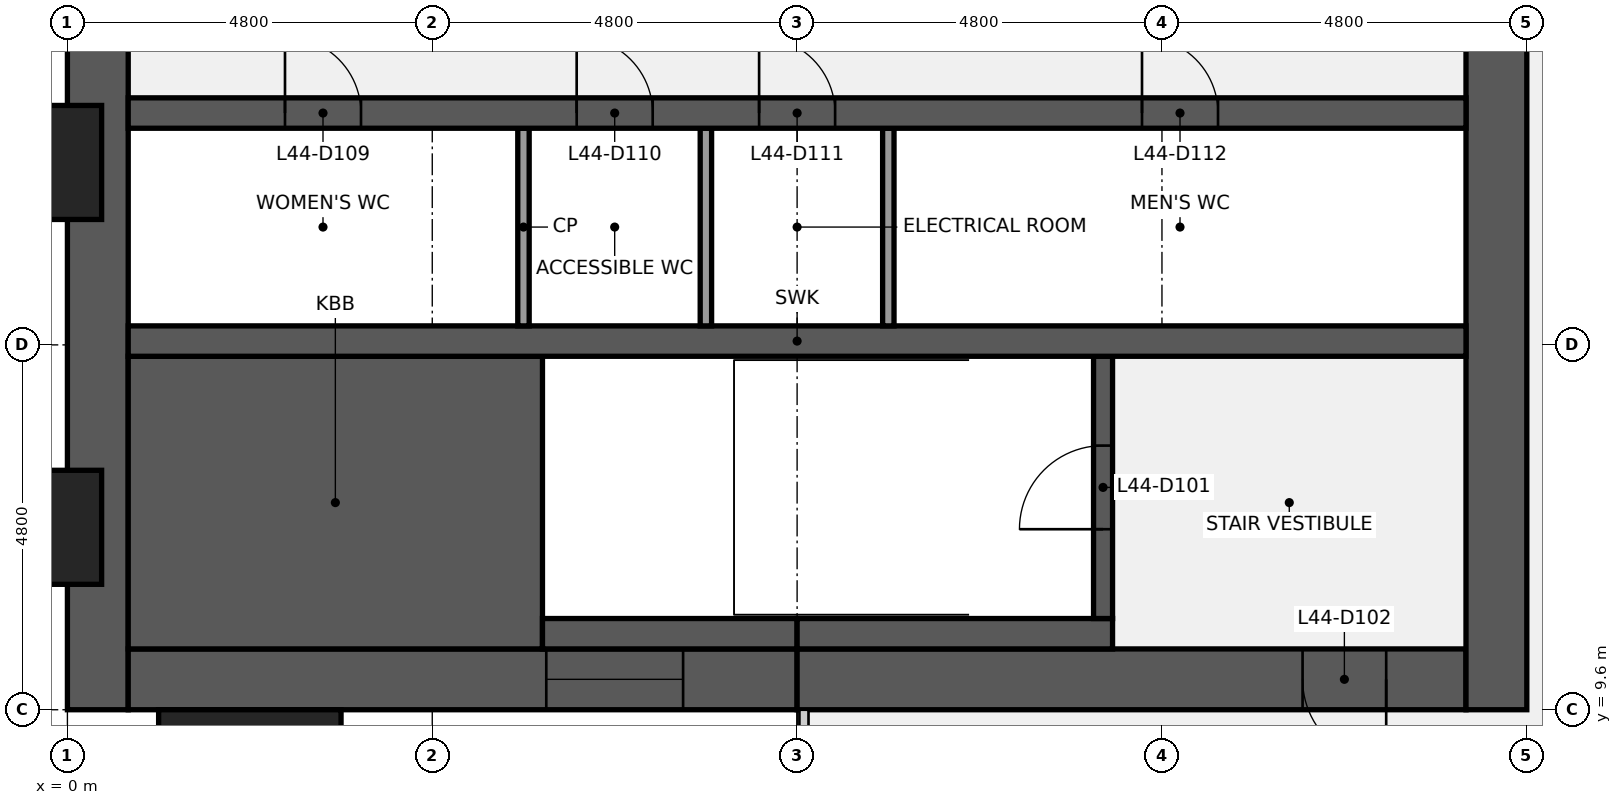
"""IFC4 building model, lengths in metres.
Left out: names, types, materials, properties, quantities, classifications, styles, units other than length and angle.
Written with IfcOpenShell. Run it as: python <this file> out.ifc"""

import sys

from ifc_helpers import new_model, si_unit, direction, frame, frame_2d, origin, origin_2d, place, context, subcontext, project, spatial, rectangle, extrude, element, fill, save


model = new_model("IFC4")
c1 = context("Model", 3, precision=1e-05, world=origin(), true_north=direction((0.0, 1.0)))
c2 = subcontext(c1, "Body", "Model", "MODEL_VIEW")
j1 = project(units=[si_unit("LENGTHUNIT", "METRE"), si_unit("PLANEANGLEUNIT", "RADIAN")], contexts=[c1])
p1 = place(None, origin())
s1 = spatial("IfcSite", under=j1, at=p1, CompositionType="ELEMENT")
p2 = place(p1, origin())
s2 = spatial("IfcBuilding", under=s1, at=p2, CompositionType="ELEMENT")
p3 = place(p2, frame((0.0, 0.0, 205.2)))
s3 = spatial("IfcBuildingStorey", under=s2, at=p3, CompositionType="ELEMENT", Elevation=205.2)
p4 = place(p3, frame((0.4, 9.6, 0.0), z_axis=(0.0, 0.0, 1.0), x_axis=(0.0, 1.0, 0.0)))
e1 = element("IfcWall", 1, at=p4, inside=s3, PredefinedType="SHEAR", context=c2, shape_type="SweptSolid", body=[
    extrude(rectangle(XDim=28.8, YDim=0.8, at=frame_2d((14.4, 0.0))), origin(), (0.0, 0.0, 1.0), 3.84),
])
p5 = place(p4, frame((8.85, 0.0, 0.9)))
e2 = element("IfcOpeningElement", 2, at=p5, cuts=e1, PredefinedType="OPENING", context=c2, shape_type="SweptSolid", body=[
    extrude(rectangle(XDim=1.5, YDim=1.5, at=frame_2d((0.75, 0.75))), frame((0.0, 0.41, 0.0), z_axis=(0.0, -1.0, 0.0), x_axis=(1.0, 0.0, 0.0)), (0.0, 0.0, 1.0), 0.82),
])
p6 = place(p4, frame((18.45, 0.0, 0.9)))
e3 = element("IfcOpeningElement", 3, at=p6, cuts=e1, PredefinedType="OPENING", context=c2, shape_type="SweptSolid", body=[
    extrude(rectangle(XDim=1.5, YDim=1.5, at=frame_2d((0.75, 0.75))), frame((0.0, 0.41, 0.0), z_axis=(0.0, -1.0, 0.0), x_axis=(1.0, 0.0, 0.0)), (0.0, 0.0, 1.0), 0.82),
])
p7 = place(p3, frame((9.6, 10.0, 0.0), z_axis=(0.0, 0.0, 1.0), x_axis=(-1.0, 0.0, 0.0)))
e4 = element("IfcWall", 4, at=p7, inside=s3, PredefinedType="SHEAR", context=c2, shape_type="SweptSolid", body=[
    extrude(rectangle(XDim=8.8, YDim=0.8, at=frame_2d((4.4, 0.0))), origin(), (0.0, 0.0, 1.0), 3.84),
])
p8 = place(p7, frame((1.5, 0.0, 0.9)))
e5 = element("IfcOpeningElement", 5, at=p8, cuts=e4, PredefinedType="OPENING", context=c2, shape_type="SweptSolid", body=[
    extrude(rectangle(XDim=1.8, YDim=1.5, at=frame_2d((0.9, 0.75))), frame((0.0, 0.41, 0.0), z_axis=(0.0, -1.0, 0.0), x_axis=(1.0, 0.0, 0.0)), (0.0, 0.0, 1.0), 0.82),
])
p9 = place(p3, frame((18.4, 10.0, 0.0), z_axis=(0.0, 0.0, 1.0), x_axis=(-1.0, 0.0, 0.0)))
e6 = element("IfcWall", 6, at=p9, inside=s3, PredefinedType="SHEAR", context=c2, shape_type="SweptSolid", body=[
    extrude(rectangle(XDim=8.8, YDim=0.8, at=frame_2d((4.4, 0.0))), origin(), (0.0, 0.0, 1.0), 3.84),
])
p10 = place(p9, frame((1.05, 0.0, 0.0)))
e7 = element("IfcOpeningElement", 7, at=p10, cuts=e6, PredefinedType="OPENING", context=c2, shape_type="SweptSolid", body=[
    extrude(rectangle(XDim=1.1, YDim=2.1, at=frame_2d((0.55, 1.05))), frame((0.0, 0.41, 0.0), z_axis=(0.0, -1.0, 0.0), x_axis=(1.0, 0.0, 0.0)), (0.0, 0.0, 1.0), 0.82),
])
p11 = place(p3, frame((18.8, 38.4, 0.0), z_axis=(0.0, 0.0, 1.0), x_axis=(0.0, -1.0, 0.0)))
e8 = element("IfcWall", 8, at=p11, inside=s3, PredefinedType="SHEAR", context=c2, shape_type="SweptSolid", body=[
    extrude(rectangle(XDim=28.8, YDim=0.8, at=frame_2d((14.4, 0.0))), origin(), (0.0, 0.0, 1.0), 3.84),
])
p12 = place(p11, frame((18.3, 0.0, 0.0)))
e9 = element("IfcOpeningElement", 9, at=p12, cuts=e8, PredefinedType="OPENING", context=c2, shape_type="SweptSolid", body=[
    extrude(rectangle(XDim=1.8, YDim=2.1, at=frame_2d((0.9, 1.05))), frame((0.0, 0.41, 0.0), z_axis=(0.0, -1.0, 0.0), x_axis=(1.0, 0.0, 0.0)), (0.0, 0.0, 1.0), 0.82),
])
p13 = place(p11, frame((8.7, 0.0, 0.0)))
e10 = element("IfcOpeningElement", 10, at=p13, cuts=e8, PredefinedType="OPENING", context=c2, shape_type="SweptSolid", body=[
    extrude(rectangle(XDim=1.8, YDim=2.1, at=frame_2d((0.9, 1.05))), frame((0.0, 0.41, 0.0), z_axis=(0.0, -1.0, 0.0), x_axis=(1.0, 0.0, 0.0)), (0.0, 0.0, 1.0), 0.82),
])
p14 = place(p3, frame((0.8, 12.325, 0.0), z_axis=(0.0, 0.0, 1.0), x_axis=(1.0, 0.0, 0.0)))
e11 = element("IfcWall", 11, at=p14, inside=s3, PredefinedType="SHEAR", context=c2, shape_type="SweptSolid", body=[
    extrude(rectangle(XDim=5.45, YDim=3.85, at=frame_2d((2.725, 0.0))), origin(), (0.0, 0.0, 1.0), 3.84),
])
p15 = place(p3, frame((6.25, 10.6, 0.0), z_axis=(0.0, 0.0, 1.0), x_axis=(1.0, 0.0, 0.0)))
e12 = element("IfcWall", 12, at=p15, inside=s3, PredefinedType="SHEAR", context=c2, shape_type="SweptSolid", body=[
    extrude(rectangle(XDim=3.35, YDim=0.4, at=frame_2d((1.675, 0.0))), origin(), (0.0, 0.0, 1.0), 3.84),
])
p16 = place(p3, frame((9.6, 10.6, 0.0), z_axis=(0.0, 0.0, 1.0), x_axis=(1.0, 0.0, 0.0)))
e13 = element("IfcWall", 13, at=p16, inside=s3, PredefinedType="SHEAR", context=c2, shape_type="SweptSolid", body=[
    extrude(rectangle(XDim=4.15, YDim=0.4, at=frame_2d((2.075, 0.0))), origin(), (0.0, 0.0, 1.0), 3.84),
])
p17 = place(p3, frame((13.625, 10.8, 0.0), z_axis=(0.0, 0.0, 1.0), x_axis=(0.0, 1.0, 0.0)))
e14 = element("IfcWall", 14, at=p17, inside=s3, PredefinedType="SHEAR", context=c2, shape_type="SweptSolid", body=[
    extrude(rectangle(XDim=3.45, YDim=0.25, at=frame_2d((1.725, 0.0))), origin(), (0.0, 0.0, 1.0), 3.84),
])
p18 = place(p17, frame((1.175, 0.0, 0.0)))
e15 = element("IfcOpeningElement", 15, at=p18, cuts=e14, PredefinedType="OPENING", context=c2, shape_type="SweptSolid", body=[
    extrude(rectangle(XDim=1.1, YDim=2.1, at=frame_2d((0.55, 1.05))), frame((0.0, 0.135, 0.0), z_axis=(0.0, -1.0, 0.0), x_axis=(1.0, 0.0, 0.0)), (0.0, 0.0, 1.0), 0.27),
])
p19 = place(p3, frame((0.8, 14.45, 0.0), z_axis=(0.0, 0.0, 1.0), x_axis=(1.0, 0.0, 0.0)))
e16 = element("IfcWall", 16, at=p19, inside=s3, PredefinedType="SHEAR", context=c2, shape_type="SweptSolid", body=[
    extrude(rectangle(XDim=17.6, YDim=0.4, at=frame_2d((8.8, 0.0))), origin(), (0.0, 0.0, 1.0), 3.84),
])
for number, where, z_axis, x_axis in (
    (17, (6.0, 14.65, 0.0), (0.0, 0.0, 1.0), (0.0, 1.0, 0.0)),
    (18, (8.4, 14.65, 0.0), (0.0, 0.0, 1.0), (0.0, 1.0, 0.0)),
    (19, (10.8, 14.65, 0.0), (0.0, 0.0, 1.0), (0.0, 1.0, 0.0)),
):
    element("IfcWall", number, at=place(p3, frame(where, z_axis=z_axis, x_axis=x_axis)), inside=s3, PredefinedType="PARTITIONING", context=c2, shape_type="SweptSolid", body=[
        extrude(rectangle(XDim=2.6, YDim=0.15, at=frame_2d((1.3, 0.0))), origin(), (0.0, 0.0, 1.0), 3.84),
    ])
p20 = place(p3, frame((0.8, 17.45, 0.0), z_axis=(0.0, 0.0, 1.0), x_axis=(1.0, 0.0, 0.0)))
e20 = element("IfcWall", 20, at=p20, inside=s3, PredefinedType="SHEAR", context=c2, shape_type="SweptSolid", body=[
    extrude(rectangle(XDim=17.6, YDim=0.4, at=frame_2d((8.8, 0.0))), origin(), (0.0, 0.0, 1.0), 3.84),
])
p21 = place(p20, frame((2.062, 0.0, 0.0)))
e21 = element("IfcOpeningElement", 21, at=p21, cuts=e20, PredefinedType="OPENING", context=c2, shape_type="SweptSolid", body=[
    extrude(rectangle(XDim=1.0, YDim=2.1, at=frame_2d((0.5, 1.05))), frame((0.0, 0.21, 0.0), z_axis=(0.0, -1.0, 0.0), x_axis=(1.0, 0.0, 0.0)), (0.0, 0.0, 1.0), 0.42),
])
p22 = place(p20, frame((5.9, 0.0, 0.0)))
e22 = element("IfcOpeningElement", 22, at=p22, cuts=e20, PredefinedType="OPENING", context=c2, shape_type="SweptSolid", body=[
    extrude(rectangle(XDim=1.0, YDim=2.1, at=frame_2d((0.5, 1.05))), frame((0.0, 0.21, 0.0), z_axis=(0.0, -1.0, 0.0), x_axis=(1.0, 0.0, 0.0)), (0.0, 0.0, 1.0), 0.42),
])
p23 = place(p20, frame((8.3, 0.0, 0.0)))
e23 = element("IfcOpeningElement", 23, at=p23, cuts=e20, PredefinedType="OPENING", context=c2, shape_type="SweptSolid", body=[
    extrude(rectangle(XDim=1.0, YDim=2.1, at=frame_2d((0.5, 1.05))), frame((0.0, 0.21, 0.0), z_axis=(0.0, -1.0, 0.0), x_axis=(1.0, 0.0, 0.0)), (0.0, 0.0, 1.0), 0.42),
])
p24 = place(p20, frame((13.337, 0.0, 0.0)))
e24 = element("IfcOpeningElement", 24, at=p24, cuts=e20, PredefinedType="OPENING", context=c2, shape_type="SweptSolid", body=[
    extrude(rectangle(XDim=1.0, YDim=2.1, at=frame_2d((0.5, 1.05))), frame((0.0, 0.21, 0.0), z_axis=(0.0, -1.0, 0.0), x_axis=(1.0, 0.0, 0.0)), (0.0, 0.0, 1.0), 0.42),
])
for number, where, z_axis, x_axis in (
    (25, (-0.75, 12.0, 0.0), (0.0, 0.0, 1.0), (0.0, 1.0, 0.0)),
    (26, (-0.75, 16.8, 0.0), (0.0, 0.0, 1.0), (0.0, 1.0, 0.0)),
    (27, (2.4, 8.85, 0.0), (0.0, 0.0, 1.0), (1.0, 0.0, 0.0)),
):
    element("IfcColumn", number, at=place(p3, frame(where, z_axis=z_axis, x_axis=x_axis)), inside=s3, PredefinedType="PILASTER", context=c2, shape_type="SweptSolid", body=[
        extrude(rectangle(XDim=2.4, YDim=1.5, at=origin_2d()), origin(), (0.0, 0.0, 1.0), 4.0),
    ])
p25 = place(p18, origin())
e28 = element("IfcDoor", 28, at=p25, inside=s3, OperationType="SINGLE_SWING_LEFT", PredefinedType="DOOR", context=c2, shape_type="SweptSolid", body=[
    extrude(rectangle(XDim=1.1, YDim=2.1, at=frame_2d((0.55, 1.05))), frame((0.0, 0.025, 0.0), z_axis=(0.0, -1.0, 0.0), x_axis=(1.0, 0.0, 0.0)), (0.0, 0.0, 1.0), 0.05),
])
fill(e15, e28)
p26 = place(p10, origin())
e29 = element("IfcDoor", 29, at=p26, inside=s3, OperationType="SINGLE_SWING_LEFT", PredefinedType="DOOR", context=c2, shape_type="SweptSolid", body=[
    extrude(rectangle(XDim=1.1, YDim=2.1, at=frame_2d((0.55, 1.05))), frame((0.0, 0.025, 0.0), z_axis=(0.0, -1.0, 0.0), x_axis=(1.0, 0.0, 0.0)), (0.0, 0.0, 1.0), 0.05),
])
fill(e7, e29)
p27 = place(p21, origin())
e30 = element("IfcDoor", 30, at=p27, inside=s3, OperationType="SINGLE_SWING_LEFT", PredefinedType="DOOR", context=c2, shape_type="SweptSolid", body=[
    extrude(rectangle(XDim=1.0, YDim=2.1, at=frame_2d((0.5, 1.05))), frame((0.0, 0.025, 0.0), z_axis=(0.0, -1.0, 0.0), x_axis=(1.0, 0.0, 0.0)), (0.0, 0.0, 1.0), 0.05),
])
fill(e21, e30)
p28 = place(p22, origin())
e31 = element("IfcDoor", 31, at=p28, inside=s3, OperationType="SINGLE_SWING_LEFT", PredefinedType="DOOR", context=c2, shape_type="SweptSolid", body=[
    extrude(rectangle(XDim=1.0, YDim=2.1, at=frame_2d((0.5, 1.05))), frame((0.0, 0.025, 0.0), z_axis=(0.0, -1.0, 0.0), x_axis=(1.0, 0.0, 0.0)), (0.0, 0.0, 1.0), 0.05),
])
fill(e22, e31)
p29 = place(p23, origin())
e32 = element("IfcDoor", 32, at=p29, inside=s3, OperationType="SINGLE_SWING_LEFT", PredefinedType="DOOR", context=c2, shape_type="SweptSolid", body=[
    extrude(rectangle(XDim=1.0, YDim=2.1, at=frame_2d((0.5, 1.05))), frame((0.0, 0.025, 0.0), z_axis=(0.0, -1.0, 0.0), x_axis=(1.0, 0.0, 0.0)), (0.0, 0.0, 1.0), 0.05),
])
fill(e23, e32)
p30 = place(p24, origin())
e33 = element("IfcDoor", 33, at=p30, inside=s3, OperationType="SINGLE_SWING_LEFT", PredefinedType="DOOR", context=c2, shape_type="SweptSolid", body=[
    extrude(rectangle(XDim=1.0, YDim=2.1, at=frame_2d((0.5, 1.05))), frame((0.0, 0.025, 0.0), z_axis=(0.0, -1.0, 0.0), x_axis=(1.0, 0.0, 0.0)), (0.0, 0.0, 1.0), 0.05),
])
fill(e24, e33)
p31 = place(p8, origin())
e34 = element("IfcWindow", 34, at=p31, inside=s3, PartitioningType="SINGLE_PANEL", PredefinedType="WINDOW", context=c2, shape_type="SweptSolid", body=[
    extrude(rectangle(XDim=1.8, YDim=1.5, at=frame_2d((0.9, 0.75))), frame((0.0, 0.03, 0.0), z_axis=(0.0, -1.0, 0.0), x_axis=(1.0, 0.0, 0.0)), (0.0, 0.0, 1.0), 0.06),
])
fill(e5, e34)
save(model, sys.argv[1])
